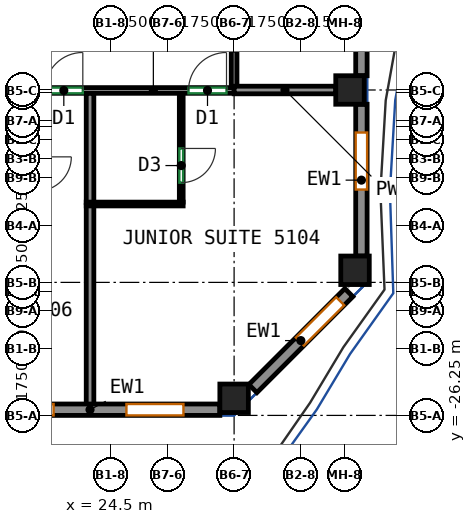
"""IFC4 building model, lengths in metres.
Left out: names, types, materials, properties, quantities, classifications, styles, units other than length and angle.
Written with IfcOpenShell. Run it as: python <this file> out.ifc"""

import sys

from ifc_helpers import new_model, si_unit, direction, frame, frame_2d, origin, origin_2d, place, context, subcontext, project, spatial, rectangle, extrude, source, transform, mapped, element, fill, save


model = new_model("IFC4")
c1 = context("Model", 3, precision=1e-05, world=origin(), true_north=direction((0.0, 1.0)))
c2 = subcontext(c1, "Body", "Model", "MODEL_VIEW")
j1 = project(units=[si_unit("LENGTHUNIT", "METRE"), si_unit("PLANEANGLEUNIT", "RADIAN")], contexts=[c1])
p1 = place(None, origin())
s1 = spatial("IfcSite", under=j1, at=p1, CompositionType="ELEMENT")
p2 = place(p1, origin())
s2 = spatial("IfcBuilding", under=s1, at=p2, CompositionType="ELEMENT")
p3 = place(p2, frame((0.0, 0.0, 210.1)))
s3 = spatial("IfcBuildingStorey", under=s2, at=p3, CompositionType="ELEMENT", Elevation=210.1)
m1 = source(origin(), c2, "Body", "SweptSolid", [
    extrude(rectangle(XDim=0.75, YDim=0.75, at=origin_2d()), origin(), (0.0, 0.0, 1.0), 3.12),
])
for number, where, z_axis, x_axis in (
    (1, (27.75, -25.8, 0.0), (0.0, 0.0, 1.0), (1.0, 0.0, 0.0)),
    (2, (30.8, -17.688, 0.0), (0.0, 0.0, 1.0), (1.0, 0.0, 0.0)),
    (3, (30.932, -22.432, 0.0), (0.0, 0.0, 1.0), (1.0, 0.0, 0.0)),
):
    element("IfcColumn", number, at=place(p3, frame(where, z_axis=z_axis, x_axis=x_axis)), inside=s3, PredefinedType="COLUMN", context=c2, shape_type="MappedRepresentation", body=[
        mapped(m1, transform((0.0, 0.0, 0.0))),
    ])
m2 = source(origin(), c2, "Body", "SweptSolid", [
    extrude(rectangle(XDim=6.833, YDim=0.3, at=frame_2d((3.417, 0.0))), origin(), (0.0, 0.0, 1.0), 3.12),
])
p4 = place(p3, frame((20.542, -26.1, 0.0), z_axis=(0.0, 0.0, 1.0), x_axis=(1.0, 0.0, 0.0)))
e4 = element("IfcWall", 4, at=p4, inside=s3, PredefinedType="SOLIDWALL", context=c2, shape_type="MappedRepresentation", body=[
    mapped(m2, transform((0.0, 0.0, 0.0))),
])
p5 = place(p4, frame((0.958, 0.0, 0.85)))
e5 = element("IfcOpeningElement", 5, at=p5, cuts=e4, PredefinedType="OPENING", context=c2, shape_type="SweptSolid", body=[
    extrude(rectangle(XDim=1.5, YDim=1.95, at=frame_2d((0.75, 0.975))), frame((0.0, 0.16, 0.0), z_axis=(0.0, -1.0, 0.0), x_axis=(1.0, 0.0, 0.0)), (0.0, 0.0, 1.0), 0.32),
])
p6 = place(p4, frame((4.375, 0.0, 0.85)))
e6 = element("IfcOpeningElement", 6, at=p6, cuts=e4, PredefinedType="OPENING", context=c2, shape_type="SweptSolid", body=[
    extrude(rectangle(XDim=1.5, YDim=1.95, at=frame_2d((0.75, 0.975))), frame((0.0, 0.16, 0.0), z_axis=(0.0, -1.0, 0.0), x_axis=(1.0, 0.0, 0.0)), (0.0, 0.0, 1.0), 0.32),
])
m3 = source(origin(), c2, "Body", "SweptSolid", [
    extrude(rectangle(XDim=3.571, YDim=0.3, at=frame_2d((1.786, 0.0))), origin(), (0.0, 0.0, 1.0), 3.12),
])
p7 = place(p3, frame((28.244, -25.544, 0.0), z_axis=(0.0, 0.0, 1.0), x_axis=(0.707072595841, 0.707140964879, 0.0)))
e7 = element("IfcWall", 7, at=p7, inside=s3, PredefinedType="SOLIDWALL", context=c2, shape_type="MappedRepresentation", body=[
    mapped(m3, transform((0.0, 0.0, 0.0))),
])
p8 = place(p7, frame((1.75, 0.0, 0.85)))
e8 = element("IfcOpeningElement", 8, at=p8, cuts=e7, PredefinedType="OPENING", context=c2, shape_type="SweptSolid", body=[
    extrude(rectangle(XDim=1.5, YDim=1.95, at=frame_2d((0.75, 0.975))), frame((0.0, 0.16, 0.0), z_axis=(0.0, -1.0, 0.0), x_axis=(1.0, 0.0, 0.0)), (0.0, 0.0, 1.0), 0.32),
])
m4 = source(origin(), c2, "Body", "SweptSolid", [
    extrude(rectangle(XDim=3.994, YDim=0.3, at=frame_2d((1.997, 0.0))), origin(), (0.0, 0.0, 1.0), 3.12),
])
p9 = place(p3, frame((31.1, -22.057, 0.0), z_axis=(0.0, 0.0, 1.0), x_axis=(0.0, 1.0, 0.0)))
e9 = element("IfcWall", 9, at=p9, inside=s3, PredefinedType="SOLIDWALL", context=c2, shape_type="MappedRepresentation", body=[
    mapped(m4, transform((0.0, 0.0, 0.0))),
])
p10 = place(p9, frame((1.75, 0.0, 0.85)))
e10 = element("IfcOpeningElement", 10, at=p10, cuts=e9, PredefinedType="OPENING", context=c2, shape_type="SweptSolid", body=[
    extrude(rectangle(XDim=1.5, YDim=1.95, at=frame_2d((0.75, 0.975))), frame((0.0, 0.16, 0.0), z_axis=(0.0, -1.0, 0.0), x_axis=(1.0, 0.0, 0.0)), (0.0, 0.0, 1.0), 0.32),
])
m5 = source(origin(), c2, "Body", "SweptSolid", [
    extrude(rectangle(XDim=7.812, YDim=0.3, at=frame_2d((3.906, 0.0))), origin(), (0.0, 0.0, 1.0), 3.12),
])
p11 = place(p3, frame((31.1, -17.312, 0.0), z_axis=(0.0, 0.0, 1.0), x_axis=(0.0, 1.0, 0.0)))
e11 = element("IfcWall", 11, at=p11, inside=s3, PredefinedType="SOLIDWALL", context=c2, shape_type="MappedRepresentation", body=[
    mapped(m5, transform((0.0, 0.0, 0.0))),
])
p12 = place(p11, frame((1.75, 0.0, 0.85)))
e12 = element("IfcOpeningElement", 12, at=p12, cuts=e11, PredefinedType="OPENING", context=c2, shape_type="SweptSolid", body=[
    extrude(rectangle(XDim=1.5, YDim=1.95, at=frame_2d((0.75, 0.975))), frame((0.0, 0.16, 0.0), z_axis=(0.0, -1.0, 0.0), x_axis=(1.0, 0.0, 0.0)), (0.0, 0.0, 1.0), 0.32),
])
p13 = place(p11, frame((5.656, 0.0, 0.85)))
e13 = element("IfcOpeningElement", 13, at=p13, cuts=e11, PredefinedType="OPENING", context=c2, shape_type="SweptSolid", body=[
    extrude(rectangle(XDim=1.5, YDim=1.95, at=frame_2d((0.75, 0.975))), frame((0.0, 0.16, 0.0), z_axis=(0.0, -1.0, 0.0), x_axis=(1.0, 0.0, 0.0)), (0.0, 0.0, 1.0), 0.32),
])
p14 = place(p11, frame((4.356, 0.0, 0.0)))
e14 = element("IfcOpeningElement", 14, at=p14, cuts=e11, PredefinedType="OPENING", context=c2, shape_type="SweptSolid", body=[
    extrude(rectangle(XDim=1.0, YDim=2.1, at=frame_2d((0.5, 1.05))), frame((0.0, 0.16, 0.0), z_axis=(0.0, -1.0, 0.0), x_axis=(1.0, 0.0, 0.0)), (0.0, 0.0, 1.0), 0.32),
])
p15 = place(p3, frame((20.667, -17.7, 0.0), z_axis=(0.0, 0.0, 1.0), x_axis=(1.0, 0.0, 0.0)))
e15 = element("IfcWall", 15, at=p15, inside=s3, PredefinedType="PARTITIONING", context=c2, shape_type="SweptSolid", body=[
    extrude(rectangle(XDim=7.083, YDim=0.15, at=frame_2d((3.542, 0.0))), origin(), (0.0, 0.0, 1.0), 2.52),
])
p16 = place(p15, frame((2.102, 0.0, 0.0)))
e16 = element("IfcOpeningElement", 16, at=p16, cuts=e15, PredefinedType="OPENING", context=c2, shape_type="SweptSolid", body=[
    extrude(rectangle(XDim=1.0, YDim=2.1, at=frame_2d((0.5, 1.05))), frame((0.0, 0.085, 0.0), z_axis=(0.0, -1.0, 0.0), x_axis=(1.0, 0.0, 0.0)), (0.0, 0.0, 1.0), 0.17),
])
p17 = place(p15, frame((5.883, 0.0, 0.0)))
e17 = element("IfcOpeningElement", 17, at=p17, cuts=e15, PredefinedType="OPENING", context=c2, shape_type="SweptSolid", body=[
    extrude(rectangle(XDim=1.0, YDim=2.1, at=frame_2d((0.5, 1.05))), frame((0.0, 0.085, 0.0), z_axis=(0.0, -1.0, 0.0), x_axis=(1.0, 0.0, 0.0)), (0.0, 0.0, 1.0), 0.17),
])
p18 = place(p3, frame((27.75, -17.598, 0.0), z_axis=(0.0, 0.0, 1.0), x_axis=(0.0, 1.0, 0.0)))
e18 = element("IfcWall", 18, at=p18, inside=s3, PredefinedType="PARTITIONING", context=c2, shape_type="SweptSolid", body=[
    extrude(rectangle(XDim=2.023, YDim=0.15, at=frame_2d((1.011, 0.0))), origin(), (0.0, 0.0, 1.0), 2.52),
])
p19 = place(p3, frame((23.959, -26.0, 0.0), z_axis=(0.0, 0.0, 1.0), x_axis=(0.0, 1.0, 0.0)))
e19 = element("IfcWall", 19, at=p19, inside=s3, PredefinedType="PARTITIONING", context=c2, shape_type="SweptSolid", body=[
    extrude(rectangle(XDim=5.272, YDim=0.2, at=frame_2d((2.636, 0.0))), origin(), (0.0, 0.0, 1.0), 3.12),
])
p20 = place(p3, frame((23.959, -20.648, 0.0), z_axis=(0.0, 0.0, 1.0), x_axis=(0.0, 1.0, 0.0)))
e20 = element("IfcWall", 20, at=p20, inside=s3, PredefinedType="PARTITIONING", context=c2, shape_type="SweptSolid", body=[
    extrude(rectangle(XDim=2.871, YDim=0.2, at=frame_2d((1.436, 0.0))), origin(), (0.0, 0.0, 1.0), 3.12),
])
p21 = place(p3, frame((23.859, -20.688, 0.0), z_axis=(0.0, 0.0, 1.0), x_axis=(1.0, 0.0, 0.0)))
e21 = element("IfcWall", 21, at=p21, inside=s3, PredefinedType="PARTITIONING", context=c2, shape_type="SweptSolid", body=[
    extrude(rectangle(XDim=2.55, YDim=0.1, at=frame_2d((1.275, 0.0))), origin(), (0.0, 0.0, 1.0), 3.12),
])
p22 = place(p3, frame((26.359, -17.777, 0.0), z_axis=(0.0, 0.0, 1.0), x_axis=(0.0, -1.0, 0.0)))
e22 = element("IfcWall", 22, at=p22, inside=s3, PredefinedType="PARTITIONING", context=c2, shape_type="SweptSolid", body=[
    extrude(rectangle(XDim=2.861, YDim=0.1, at=frame_2d((1.43, 0.0))), origin(), (0.0, 0.0, 1.0), 3.12),
])
p23 = place(p22, frame((1.449, 0.0, 0.0)))
e23 = element("IfcOpeningElement", 23, at=p23, cuts=e22, PredefinedType="OPENING", context=c2, shape_type="SweptSolid", body=[
    extrude(rectangle(XDim=0.9, YDim=2.1, at=frame_2d((0.45, 1.05))), frame((0.0, 0.06, 0.0), z_axis=(0.0, -1.0, 0.0), x_axis=(1.0, 0.0, 0.0)), (0.0, 0.0, 1.0), 0.12),
])
p24 = place(p3, frame((27.752, -17.688, 0.0), z_axis=(0.0, 0.0, 1.0), x_axis=(1.0, 0.0, 0.0)))
e24 = element("IfcWall", 24, at=p24, inside=s3, PredefinedType="PARTITIONING", context=c2, shape_type="SweptSolid", body=[
    extrude(rectangle(XDim=2.673, YDim=0.2, at=frame_2d((1.336, 0.0))), origin(), (0.0, 0.0, 1.0), 2.52),
])
p25 = place(p5, origin())
e25 = element("IfcWindow", 25, at=p25, inside=s3, PartitioningType="SINGLE_PANEL", PredefinedType="WINDOW", context=c2, shape_type="SweptSolid", body=[
    extrude(rectangle(XDim=1.5, YDim=1.95, at=frame_2d((0.75, 0.975))), frame((0.0, 0.03, 0.0), z_axis=(0.0, -1.0, 0.0), x_axis=(1.0, 0.0, 0.0)), (0.0, 0.0, 1.0), 0.06),
])
fill(e5, e25)
p26 = place(p6, origin())
e26 = element("IfcWindow", 26, at=p26, inside=s3, PartitioningType="SINGLE_PANEL", PredefinedType="WINDOW", context=c2, shape_type="SweptSolid", body=[
    extrude(rectangle(XDim=1.5, YDim=1.95, at=frame_2d((0.75, 0.975))), frame((0.0, 0.03, 0.0), z_axis=(0.0, -1.0, 0.0), x_axis=(1.0, 0.0, 0.0)), (0.0, 0.0, 1.0), 0.06),
])
fill(e6, e26)
p27 = place(p8, origin())
e27 = element("IfcWindow", 27, at=p27, inside=s3, PartitioningType="SINGLE_PANEL", PredefinedType="WINDOW", context=c2, shape_type="SweptSolid", body=[
    extrude(rectangle(XDim=1.5, YDim=1.95, at=frame_2d((0.75, 0.975))), frame((0.0, 0.03, 0.0), z_axis=(0.0, -1.0, 0.0), x_axis=(1.0, 0.0, 0.0)), (0.0, 0.0, 1.0), 0.06),
])
fill(e8, e27)
p28 = place(p10, origin())
e28 = element("IfcWindow", 28, at=p28, inside=s3, PartitioningType="SINGLE_PANEL", PredefinedType="WINDOW", context=c2, shape_type="SweptSolid", body=[
    extrude(rectangle(XDim=1.5, YDim=1.95, at=frame_2d((0.75, 0.975))), frame((0.0, 0.03, 0.0), z_axis=(0.0, -1.0, 0.0), x_axis=(1.0, 0.0, 0.0)), (0.0, 0.0, 1.0), 0.06),
])
fill(e10, e28)
p29 = place(p23, origin())
e29 = element("IfcDoor", 29, at=p29, inside=s3, OperationType="SINGLE_SWING_LEFT", PredefinedType="DOOR", context=c2, shape_type="SweptSolid", body=[
    extrude(rectangle(XDim=0.9, YDim=2.1, at=frame_2d((0.45, 1.05))), frame((0.0, 0.025, 0.0), z_axis=(0.0, -1.0, 0.0), x_axis=(1.0, 0.0, 0.0)), (0.0, 0.0, 1.0), 0.05),
])
fill(e23, e29)
p30 = place(p16, origin())
e30 = element("IfcDoor", 30, at=p30, inside=s3, OperationType="SINGLE_SWING_RIGHT", PredefinedType="DOOR", context=c2, shape_type="SweptSolid", body=[
    extrude(rectangle(XDim=1.0, YDim=2.1, at=frame_2d((0.5, 1.05))), frame((0.0, 0.025, 0.0), z_axis=(0.0, -1.0, 0.0), x_axis=(1.0, 0.0, 0.0)), (0.0, 0.0, 1.0), 0.05),
])
fill(e16, e30)
p31 = place(p17, origin())
e31 = element("IfcDoor", 31, at=p31, inside=s3, OperationType="SINGLE_SWING_RIGHT", PredefinedType="DOOR", context=c2, shape_type="SweptSolid", body=[
    extrude(rectangle(XDim=1.0, YDim=2.1, at=frame_2d((0.5, 1.05))), frame((0.0, 0.025, 0.0), z_axis=(0.0, -1.0, 0.0), x_axis=(1.0, 0.0, 0.0)), (0.0, 0.0, 1.0), 0.05),
])
fill(e17, e31)
save(model, sys.argv[1])
